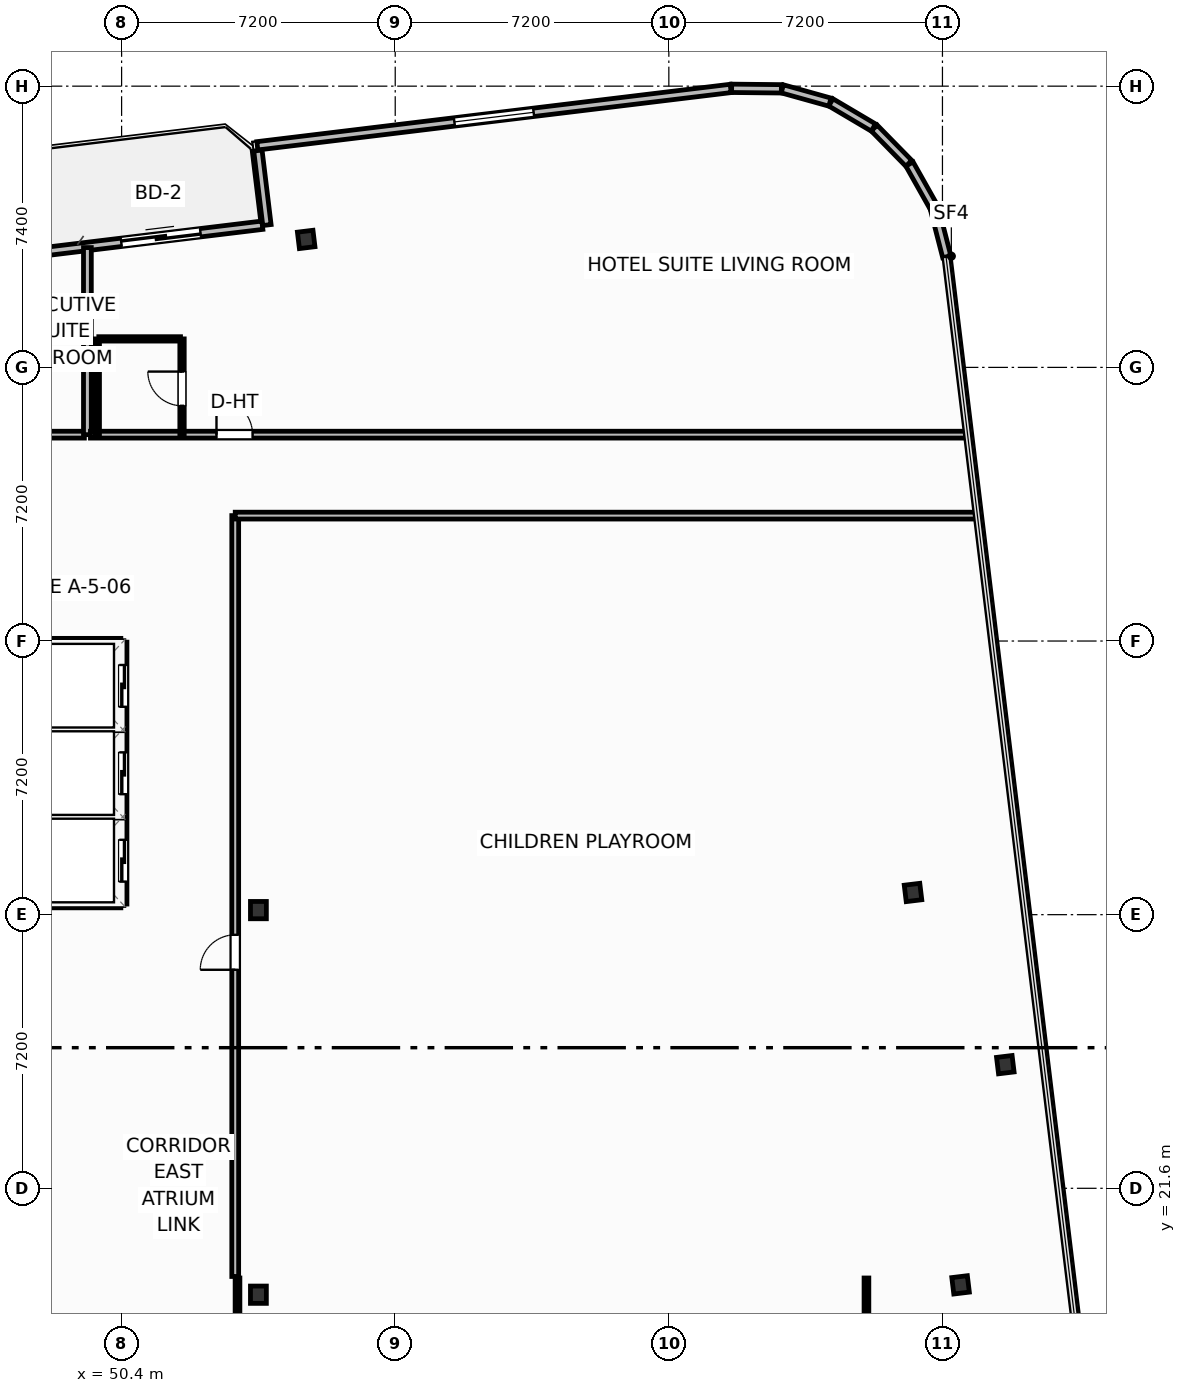
"""IFC4 building model, lengths in metres.
Left out: names, types, materials, properties, quantities, classifications, styles, units other than length and angle.
Written with IfcOpenShell. Run it as: python <this file> out.ifc"""

import sys

from ifc_helpers import new_model, si_unit, direction, frame, frame_2d, origin, origin_2d, place, context, subcontext, project, spatial, rectangle, i_section, extrude, element, fill, save


model = new_model("IFC4")
c1 = context("Model", 3, precision=1e-05, world=origin(), true_north=direction((0.0, 1.0)))
c2 = subcontext(c1, "Body", "Model", "MODEL_VIEW")
j1 = project(units=[si_unit("LENGTHUNIT", "METRE"), si_unit("PLANEANGLEUNIT", "RADIAN")], contexts=[c1])
p1 = place(None, origin())
s1 = spatial("IfcSite", under=j1, at=p1, CompositionType="ELEMENT")
p2 = place(p1, origin())
s2 = spatial("IfcBuilding", under=s1, at=p2, CompositionType="ELEMENT")
p3 = place(p2, frame((0.0, 0.0, 182.0)))
s3 = spatial("IfcBuildingStorey", under=s2, at=p3, CompositionType="ELEMENT", Elevation=182.0)
for number, where, z_axis, x_axis in (
    (1, (54.0, 18.8, 0.0), (0.0, 0.0, 1.0), (1.0, 0.0, 0.0)),
    (2, (54.0, 28.92, 0.0), (0.0, 0.0, 1.0), (1.0, 0.0, 0.0)),
):
    element("IfcColumn", number, at=place(p3, frame(where, z_axis=z_axis, x_axis=x_axis)), inside=s3, PredefinedType="COLUMN", context=c2, shape_type="SweptSolid", body=[
        extrude(i_section(OverallWidth=0.418, OverallDepth=0.455, WebThickness=0.042, FlangeThickness=0.068, FilletRadius=0.025, at=origin_2d()), origin(), (0.0, 0.0, 1.0), 3.7),
    ])
for number, where, z_axis, x_axis in (
    (3, (72.477, 19.059, 0.0), (0.0, 0.0, 1.0), (0.993, 0.12, 0.0)),
    (4, (73.654, 24.853, 0.0), (0.0, 0.0, 1.0), (0.993, 0.12, 0.0)),
    (5, (71.225, 29.384, 0.0), (0.0, 0.0, 1.0), (0.993, 0.12, 0.0)),
    (6, (55.257, 46.567, 0.0), (0.0, 0.0, 1.0), (0.993, 0.12, 0.0)),
):
    element("IfcColumn", number, at=place(p3, frame(where, z_axis=z_axis, x_axis=x_axis)), inside=s3, PredefinedType="COLUMN", context=c2, shape_type="SweptSolid", body=[
        extrude(i_section(OverallWidth=0.412, OverallDepth=0.435, WebThickness=0.036, FlangeThickness=0.057, FilletRadius=0.025, at=origin_2d()), origin(), (0.0, 0.0, 1.0), 3.7),
    ])
p4 = place(p3, frame((48.148, 46.219, 0.0), z_axis=(0.0, 0.0, 1.0), x_axis=(0.992729951822, 0.120362962556, 0.0)))
e7 = element("IfcWall", 7, at=p4, inside=s3, PredefinedType="SOLIDWALL", context=c2, shape_type="SweptSolid", body=[
    extrude(rectangle(XDim=6.0, YDim=0.22, at=frame_2d((3.0, 0.0))), origin(), (0.0, 0.0, 1.0), 2.73),
])
p5 = place(p4, frame((2.26, 0.0, 0.0)))
e8 = element("IfcOpeningElement", 8, at=p5, cuts=e7, PredefinedType="OPENING", context=c2, shape_type="SweptSolid", body=[
    extrude(rectangle(XDim=2.1, YDim=2.3, at=frame_2d((1.05, 1.15))), frame((0.0, 0.12, 0.0), z_axis=(0.0, -1.0, 0.0), x_axis=(1.0, 0.0, 0.0)), (0.0, 0.0, 1.0), 0.24),
])
p6 = place(p3, frame((72.114, 46.112, 0.0), z_axis=(0.0, 0.0, 1.0), x_axis=(-0.248942347653, 0.968518305219, 0.0)))
e9 = element("IfcWall", 9, at=p6, inside=s3, PredefinedType="SOLIDWALL", context=c2, shape_type="SweptSolid", body=[
    extrude(rectangle(XDim=1.326, YDim=0.22, at=frame_2d((0.663, 0.0))), origin(), (0.0, 0.0, 1.0), 2.73),
])
p7 = place(p3, frame((71.771, 47.418, 0.0), z_axis=(0.0, 0.0, 1.0), x_axis=(-0.491098509465, 0.871104043155, 0.0)))
e10 = element("IfcWall", 10, at=p7, inside=s3, PredefinedType="SOLIDWALL", context=c2, shape_type="SweptSolid", body=[
    extrude(rectangle(XDim=1.301, YDim=0.22, at=frame_2d((0.65, 0.0))), origin(), (0.0, 0.0, 1.0), 2.73),
])
p8 = place(p3, frame((71.115, 48.569, 0.0), z_axis=(0.0, 0.0, 1.0), x_axis=(-0.699844331926, 0.714295394827, 0.0)))
e11 = element("IfcWall", 11, at=p8, inside=s3, PredefinedType="SOLIDWALL", context=c2, shape_type="SweptSolid", body=[
    extrude(rectangle(XDim=1.301, YDim=0.22, at=frame_2d((0.65, 0.0))), origin(), (0.0, 0.0, 1.0), 2.73),
])
p9 = place(p3, frame((70.183, 49.511, 0.0), z_axis=(0.0, 0.0, 1.0), x_axis=(-0.860933999601, 0.508716668029, 0.0)))
e12 = element("IfcWall", 12, at=p9, inside=s3, PredefinedType="SOLIDWALL", context=c2, shape_type="SweptSolid", body=[
    extrude(rectangle(XDim=1.301, YDim=0.22, at=frame_2d((0.65, 0.0))), origin(), (0.0, 0.0, 1.0), 2.73),
])
p10 = place(p3, frame((69.039, 50.18, 0.0), z_axis=(0.0, 0.0, 1.0), x_axis=(-0.963205341366, 0.26876657226, 0.0)))
e13 = element("IfcWall", 13, at=p10, inside=s3, PredefinedType="SOLIDWALL", context=c2, shape_type="SweptSolid", body=[
    extrude(rectangle(XDim=1.301, YDim=0.22, at=frame_2d((0.65, 0.0))), origin(), (0.0, 0.0, 1.0), 2.73),
])
p11 = place(p3, frame((67.761, 50.53, 0.0), z_axis=(0.0, 0.0, 1.0), x_axis=(-0.999947358106, 0.010260653861, 0.0)))
e14 = element("IfcWall", 14, at=p11, inside=s3, PredefinedType="SOLIDWALL", context=c2, shape_type="SweptSolid", body=[
    extrude(rectangle(XDim=1.309, YDim=0.22, at=frame_2d((0.654, 0.0))), origin(), (0.0, 0.0, 1.0), 2.73),
])
p12 = place(p3, frame((66.427, 50.54, 0.0), z_axis=(0.0, 0.0, 1.0), x_axis=(-0.992731739233, -0.120348219431, 0.0)))
e15 = element("IfcWall", 15, at=p12, inside=s3, PredefinedType="SOLIDWALL", context=c2, shape_type="SweptSolid", body=[
    extrude(rectangle(XDim=12.547, YDim=0.22, at=frame_2d((6.273, 0.0))), origin(), (0.0, 0.0, 1.0), 2.73),
])
p13 = place(p12, frame((5.224, 0.0, 0.8)))
e16 = element("IfcOpeningElement", 16, at=p13, cuts=e15, PredefinedType="OPENING", context=c2, shape_type="SweptSolid", body=[
    extrude(rectangle(XDim=2.1, YDim=1.75, at=frame_2d((1.05, 0.875))), frame((0.0, 0.12, 0.0), z_axis=(0.0, -1.0, 0.0), x_axis=(1.0, 0.0, 0.0)), (0.0, 0.0, 1.0), 0.24),
])
p14 = place(p3, frame((53.987, 48.906, 0.0), z_axis=(0.0, 0.0, 1.0), x_axis=(0.120397815541, -0.992725725472, 0.0)))
e17 = element("IfcWall", 17, at=p14, inside=s3, PredefinedType="SOLIDWALL", context=c2, shape_type="SweptSolid", body=[
    extrude(rectangle(XDim=1.975, YDim=0.22, at=frame_2d((0.988, 0.0))), origin(), (0.0, 0.0, 1.0), 2.73),
])
p15 = place(p3, frame((53.45, 16.61, 0.0), z_axis=(0.0, 0.0, 1.0), x_axis=(0.0, 1.0, 0.0)))
e18 = element("IfcWall", 18, at=p15, inside=s3, PredefinedType="PARTITIONING", context=c2, shape_type="SweptSolid", body=[
    extrude(rectangle(XDim=2.63, YDim=0.125, at=frame_2d((1.315, 0.0))), origin(), (0.0, 0.0, 1.0), 2.662),
])
p16 = place(p3, frame((70.0, 16.61, 0.0), z_axis=(0.0, 0.0, 1.0), x_axis=(0.0, 1.0, 0.0)))
e19 = element("IfcWall", 19, at=p16, inside=s3, PredefinedType="PARTITIONING", context=c2, shape_type="SweptSolid", body=[
    extrude(rectangle(XDim=2.63, YDim=0.125, at=frame_2d((1.315, 0.0))), origin(), (0.0, 0.0, 1.0), 3.45),
])
p17 = place(p3, frame((40.58, 41.43, 0.0), z_axis=(0.0, 0.0, 1.0), x_axis=(1.0, 0.0, 0.0)))
e20 = element("IfcWall", 20, at=p17, inside=s3, PredefinedType="PARTITIONING", context=c2, shape_type="SweptSolid", body=[
    extrude(rectangle(XDim=8.84, YDim=0.18, at=frame_2d((4.42, 0.0))), origin(), (0.0, 0.0, 1.0), 3.45),
])
p18 = place(p17, frame((3.23, 0.0, 0.0)))
e21 = element("IfcOpeningElement", 21, at=p18, cuts=e20, PredefinedType="OPENING", context=c2, shape_type="SweptSolid", body=[
    extrude(rectangle(XDim=0.95, YDim=2.15, at=frame_2d((0.475, 1.075))), frame((0.0, 0.1, 0.0), z_axis=(0.0, -1.0, 0.0), x_axis=(1.0, 0.0, 0.0)), (0.0, 0.0, 1.0), 0.2),
])
p19 = place(p3, frame((49.5, 41.43, 0.0), z_axis=(0.0, 0.0, 1.0), x_axis=(0.0, 1.0, 0.0)))
e22 = element("IfcWall", 22, at=p19, inside=s3, PredefinedType="PARTITIONING", context=c2, shape_type="SweptSolid", body=[
    extrude(rectangle(XDim=4.923, YDim=0.205, at=frame_2d((2.461, 0.0))), origin(), (0.0, 0.0, 1.0), 3.45),
])
p20 = place(p3, frame((49.58, 41.43, 0.0), z_axis=(0.0, 0.0, 1.0), x_axis=(1.0, 0.0, 0.0)))
e23 = element("IfcWall", 23, at=p20, inside=s3, PredefinedType="PARTITIONING", context=c2, shape_type="SweptSolid", body=[
    extrude(rectangle(XDim=23.042, YDim=0.18, at=frame_2d((11.521, 0.0))), origin(), (0.0, 0.0, 1.0), 3.45),
])
p21 = place(p20, frame((3.317, 0.0, 0.0)))
e24 = element("IfcOpeningElement", 24, at=p21, cuts=e23, PredefinedType="OPENING", context=c2, shape_type="SweptSolid", body=[
    extrude(rectangle(XDim=0.95, YDim=2.15, at=frame_2d((0.475, 1.075))), frame((0.0, 0.1, 0.0), z_axis=(0.0, -1.0, 0.0), x_axis=(1.0, 0.0, 0.0)), (0.0, 0.0, 1.0), 0.2),
])
p22 = place(p3, frame((49.8, 43.95, 0.0), z_axis=(0.0, 0.0, 1.0), x_axis=(1.0, 0.0, 0.0)))
e25 = element("IfcWall", 25, at=p22, inside=s3, PredefinedType="PARTITIONING", context=c2, shape_type="SweptSolid", body=[
    extrude(rectangle(XDim=2.15, YDim=0.115, at=frame_2d((1.075, 0.0))), origin(), (0.0, 0.0, 1.0), 3.45),
])
p23 = place(p3, frame((51.99, 41.43, 0.0), z_axis=(0.0, 0.0, 1.0), x_axis=(0.0, 1.0, 0.0)))
e26 = element("IfcWall", 26, at=p23, inside=s3, PredefinedType="PARTITIONING", context=c2, shape_type="SweptSolid", body=[
    extrude(rectangle(XDim=2.52, YDim=0.115, at=frame_2d((1.26, 0.0))), origin(), (0.0, 0.0, 1.0), 3.45),
])
p24 = place(p23, frame((0.76, 0.0, 0.0)))
e27 = element("IfcOpeningElement", 27, at=p24, cuts=e26, PredefinedType="OPENING", context=c2, shape_type="SweptSolid", body=[
    extrude(rectangle(XDim=0.9, YDim=2.05, at=frame_2d((0.45, 1.025))), frame((0.0, 0.067, 0.0), z_axis=(0.0, -1.0, 0.0), x_axis=(1.0, 0.0, 0.0)), (0.0, 0.0, 1.0), 0.135),
])
p25 = place(p3, frame((49.76, 41.43, 0.0), z_axis=(0.0, 0.0, 1.0), x_axis=(0.0, 1.0, 0.0)))
e28 = element("IfcWall", 28, at=p25, inside=s3, PredefinedType="PARTITIONING", context=c2, shape_type="SweptSolid", body=[
    extrude(rectangle(XDim=2.52, YDim=0.115, at=frame_2d((1.26, 0.0))), origin(), (0.0, 0.0, 1.0), 3.45),
])
p26 = place(p3, frame((53.39, 19.28, 0.0), z_axis=(0.0, 0.0, 1.0), x_axis=(0.0, 1.0, 0.0)))
e29 = element("IfcWall", 29, at=p26, inside=s3, PredefinedType="PARTITIONING", context=c2, shape_type="SweptSolid", body=[
    extrude(rectangle(XDim=20.02, YDim=0.18, at=frame_2d((10.01, 0.0))), origin(), (0.0, 0.0, 1.0), 3.45),
])
p27 = place(p26, frame((8.07, 0.0, 0.0)))
e30 = element("IfcOpeningElement", 30, at=p27, cuts=e29, PredefinedType="OPENING", context=c2, shape_type="SweptSolid", body=[
    extrude(rectangle(XDim=0.92, YDim=2.05, at=frame_2d((0.46, 1.025))), frame((0.0, 0.1, 0.0), z_axis=(0.0, -1.0, 0.0), x_axis=(1.0, 0.0, 0.0)), (0.0, 0.0, 1.0), 0.2),
])
p28 = place(p3, frame((53.39, 39.3, 0.0), z_axis=(0.0, 0.0, 1.0), x_axis=(1.0, 0.0, 0.0)))
e31 = element("IfcWall", 31, at=p28, inside=s3, PredefinedType="PARTITIONING", context=c2, shape_type="SweptSolid", body=[
    extrude(rectangle(XDim=19.49, YDim=0.18, at=frame_2d((9.745, 0.0))), origin(), (0.0, 0.0, 1.0), 3.45),
])
for number, where, z_axis, x_axis in (
    (32, (48.32, 31.375, 0.0), (0.0, 0.0, 1.0), (1.0, 0.0, 0.0)),
    (33, (48.32, 33.675, 0.0), (0.0, 0.0, 1.0), (1.0, 0.0, 0.0)),
):
    element("IfcWall", number, at=place(p3, frame(where, z_axis=z_axis, x_axis=x_axis)), inside=s3, PredefinedType="PARTITIONING", context=c2, shape_type="SweptSolid", body=[
        extrude(rectangle(XDim=2.06, YDim=0.2, at=frame_2d((1.03, 0.0))), origin(), (0.0, 0.0, 1.0), 3.45),
    ])
p29 = place(p3, frame((48.32, 29.08, 0.0), z_axis=(0.0, 0.0, 1.0), x_axis=(1.0, 0.0, 0.0)))
e34 = element("IfcWall", 34, at=p29, inside=s3, PredefinedType="PARTITIONING", context=c2, shape_type="SweptSolid", body=[
    extrude(rectangle(XDim=2.06, YDim=0.2, at=frame_2d((1.03, 0.0))), origin(), (0.0, 0.0, 1.0), 2.662),
])
p30 = place(p3, frame((48.32, 35.97, 0.0), z_axis=(0.0, 0.0, 1.0), x_axis=(1.0, 0.0, 0.0)))
e35 = element("IfcWall", 35, at=p30, inside=s3, PredefinedType="PARTITIONING", context=c2, shape_type="SweptSolid", body=[
    extrude(rectangle(XDim=2.06, YDim=0.2, at=frame_2d((1.03, 0.0))), origin(), (0.0, 0.0, 1.0), 3.45),
])
p31 = place(p3, frame((50.44, 29.08, 0.0), z_axis=(0.0, 0.0, 1.0), x_axis=(0.0, 1.0, 0.0)))
e36 = element("IfcWall", 36, at=p31, inside=s3, PredefinedType="PARTITIONING", context=c2, shape_type="SweptSolid", body=[
    extrude(rectangle(XDim=6.89, YDim=0.2, at=frame_2d((3.445, 0.0))), origin(), (0.0, 0.0, 1.0), 3.45),
])
p32 = place(p31, frame((0.59, 0.0, 0.0)))
e37 = element("IfcOpeningElement", 37, at=p32, cuts=e36, PredefinedType="OPENING", context=c2, shape_type="SweptSolid", body=[
    extrude(rectangle(XDim=1.1, YDim=2.15, at=frame_2d((0.55, 1.075))), frame((0.0, 0.11, 0.0), z_axis=(0.0, -1.0, 0.0), x_axis=(1.0, 0.0, 0.0)), (0.0, 0.0, 1.0), 0.22),
])
p33 = place(p31, frame((2.89, 0.0, 0.0)))
e38 = element("IfcOpeningElement", 38, at=p33, cuts=e36, PredefinedType="OPENING", context=c2, shape_type="SweptSolid", body=[
    extrude(rectangle(XDim=1.1, YDim=2.15, at=frame_2d((0.55, 1.075))), frame((0.0, 0.11, 0.0), z_axis=(0.0, -1.0, 0.0), x_axis=(1.0, 0.0, 0.0)), (0.0, 0.0, 1.0), 0.22),
])
p34 = place(p31, frame((5.19, 0.0, 0.0)))
e39 = element("IfcOpeningElement", 39, at=p34, cuts=e36, PredefinedType="OPENING", context=c2, shape_type="SweptSolid", body=[
    extrude(rectangle(XDim=1.1, YDim=2.15, at=frame_2d((0.55, 1.075))), frame((0.0, 0.11, 0.0), z_axis=(0.0, -1.0, 0.0), x_axis=(1.0, 0.0, 0.0)), (0.0, 0.0, 1.0), 0.22),
])
p35 = place(p5, origin())
e40 = element("IfcDoor", 40, at=p35, inside=s3, OperationType="SLIDING_TO_LEFT", PredefinedType="DOOR", context=c2, shape_type="SweptSolid", body=[
    extrude(rectangle(XDim=2.1, YDim=2.3, at=frame_2d((1.05, 1.15))), frame((0.0, 0.025, 0.0), z_axis=(0.0, -1.0, 0.0), x_axis=(1.0, 0.0, 0.0)), (0.0, 0.0, 1.0), 0.05),
])
fill(e8, e40)
p36 = place(p13, origin())
e41 = element("IfcWindow", 41, at=p36, inside=s3, PartitioningType="SINGLE_PANEL", PredefinedType="WINDOW", context=c2, shape_type="SweptSolid", body=[
    extrude(rectangle(XDim=2.1, YDim=1.75, at=frame_2d((1.05, 0.875))), frame((0.0, 0.03, 0.0), z_axis=(0.0, -1.0, 0.0), x_axis=(1.0, 0.0, 0.0)), (0.0, 0.0, 1.0), 0.06),
])
fill(e16, e41)
p37 = place(p21, origin())
e42 = element("IfcDoor", 42, at=p37, inside=s3, OperationType="SINGLE_SWING_LEFT", PredefinedType="DOOR", context=c2, shape_type="SweptSolid", body=[
    extrude(rectangle(XDim=0.95, YDim=2.15, at=frame_2d((0.475, 1.075))), frame((0.0, 0.025, 0.0), z_axis=(0.0, -1.0, 0.0), x_axis=(1.0, 0.0, 0.0)), (0.0, 0.0, 1.0), 0.05),
])
fill(e24, e42)
p38 = place(p24, origin())
e43 = element("IfcDoor", 43, at=p38, inside=s3, OperationType="SINGLE_SWING_RIGHT", PredefinedType="DOOR", context=c2, shape_type="SweptSolid", body=[
    extrude(rectangle(XDim=0.9, YDim=2.05, at=frame_2d((0.45, 1.025))), frame((0.0, 0.025, 0.0), z_axis=(0.0, -1.0, 0.0), x_axis=(1.0, 0.0, 0.0)), (0.0, 0.0, 1.0), 0.05),
])
fill(e27, e43)
p39 = place(p27, origin())
e44 = element("IfcDoor", 44, at=p39, inside=s3, OperationType="SINGLE_SWING_LEFT", PredefinedType="DOOR", context=c2, shape_type="SweptSolid", body=[
    extrude(rectangle(XDim=0.92, YDim=2.05, at=frame_2d((0.46, 1.025))), frame((0.0, 0.025, 0.0), z_axis=(0.0, -1.0, 0.0), x_axis=(1.0, 0.0, 0.0)), (0.0, 0.0, 1.0), 0.05),
])
fill(e30, e44)
p40 = place(p32, origin())
e45 = element("IfcDoor", 45, at=p40, inside=s3, OperationType="SLIDING_TO_LEFT", PredefinedType="DOOR", context=c2, shape_type="SweptSolid", body=[
    extrude(rectangle(XDim=1.1, YDim=2.15, at=frame_2d((0.55, 1.075))), frame((0.0, 0.025, 0.0), z_axis=(0.0, -1.0, 0.0), x_axis=(1.0, 0.0, 0.0)), (0.0, 0.0, 1.0), 0.05),
])
fill(e37, e45)
p41 = place(p33, origin())
e46 = element("IfcDoor", 46, at=p41, inside=s3, OperationType="SLIDING_TO_LEFT", PredefinedType="DOOR", context=c2, shape_type="SweptSolid", body=[
    extrude(rectangle(XDim=1.1, YDim=2.15, at=frame_2d((0.55, 1.075))), frame((0.0, 0.025, 0.0), z_axis=(0.0, -1.0, 0.0), x_axis=(1.0, 0.0, 0.0)), (0.0, 0.0, 1.0), 0.05),
])
fill(e38, e46)
p42 = place(p34, origin())
e47 = element("IfcDoor", 47, at=p42, inside=s3, OperationType="SLIDING_TO_LEFT", PredefinedType="DOOR", context=c2, shape_type="SweptSolid", body=[
    extrude(rectangle(XDim=1.1, YDim=2.15, at=frame_2d((0.55, 1.075))), frame((0.0, 0.025, 0.0), z_axis=(0.0, -1.0, 0.0), x_axis=(1.0, 0.0, 0.0)), (0.0, 0.0, 1.0), 0.05),
])
fill(e39, e47)
save(model, sys.argv[1])
